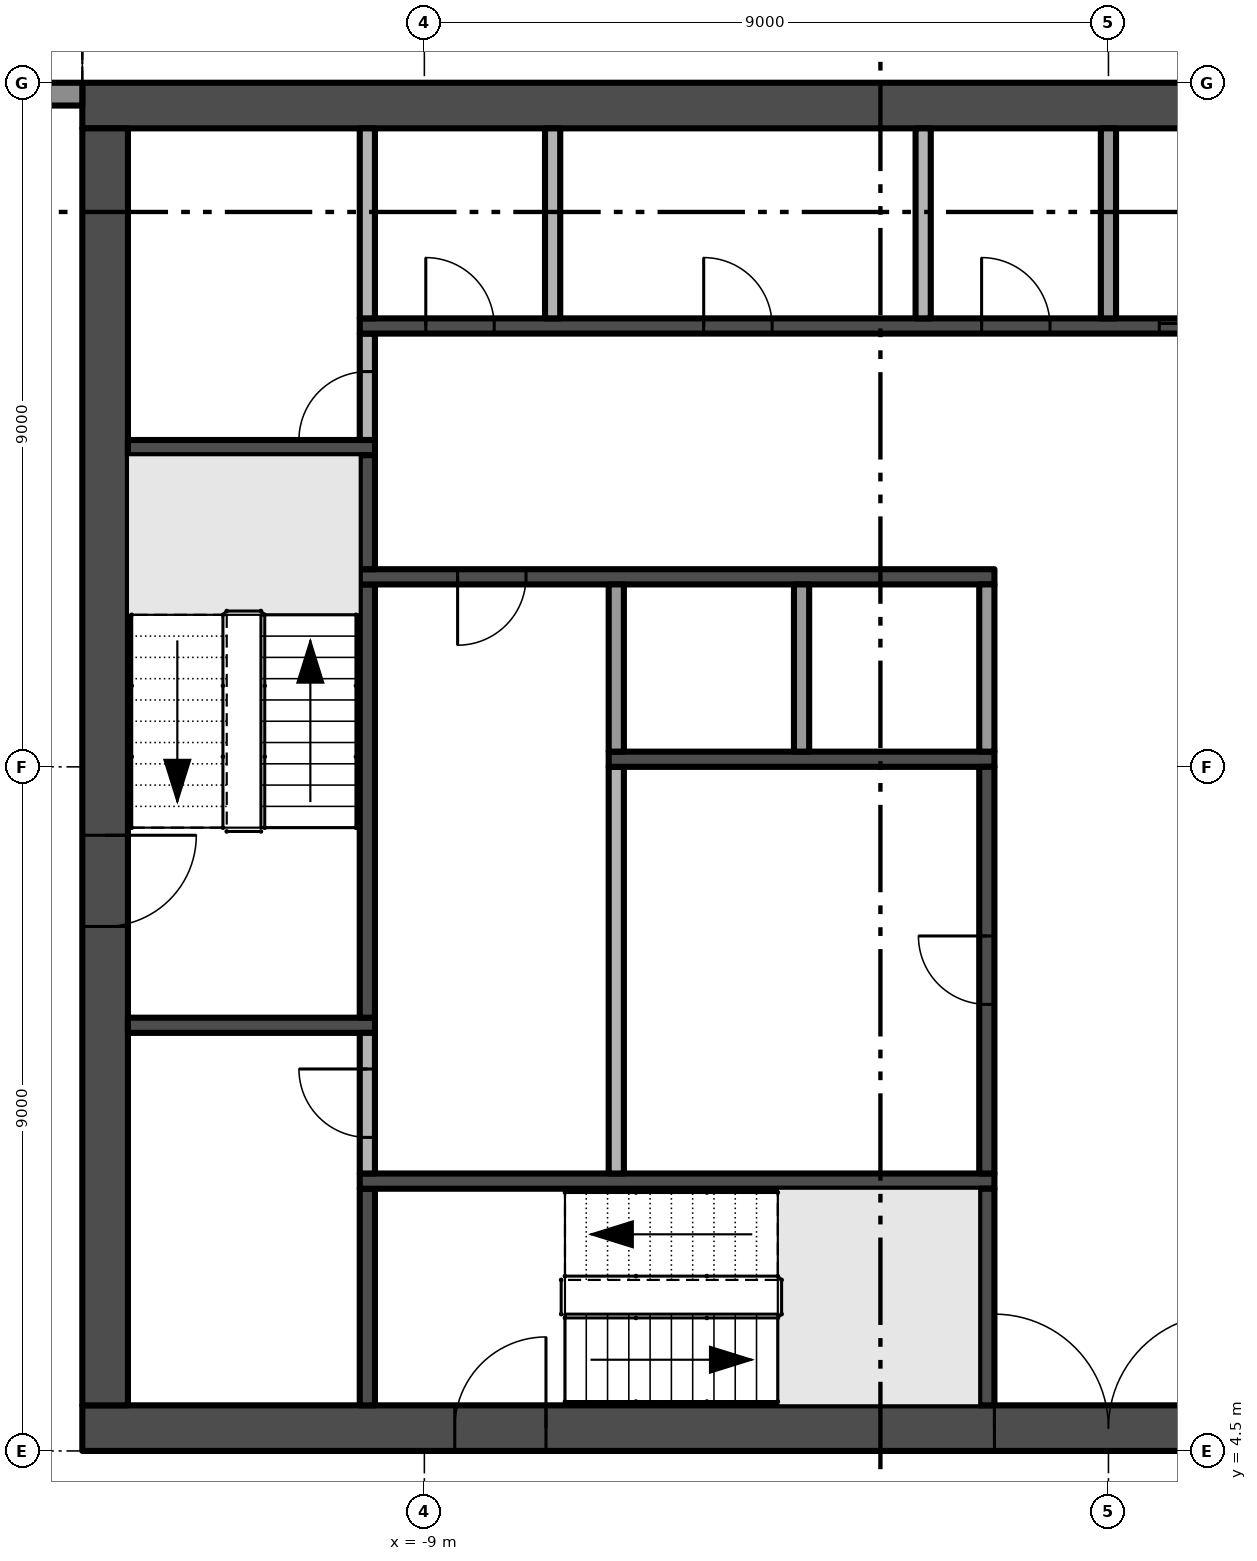
"""IFC4 building model, lengths in metres.
Left out: names, types, materials, properties, quantities, classifications, styles, units other than length and angle.
Written with IfcOpenShell. Run it as: python <this file> out.ifc"""

import sys

from ifc_helpers import new_model, si_unit, direction, frame, frame_2d, origin, place, context, subcontext, project, spatial, polyline, rectangle, outline, extrude, element, fill, save


model = new_model("IFC4")
c1 = context("Model", 3, precision=1e-05, world=origin(), true_north=direction((0.0, 1.0)))
c2 = subcontext(c1, "Body", "Model", "MODEL_VIEW")
j1 = project(units=[si_unit("LENGTHUNIT", "METRE"), si_unit("PLANEANGLEUNIT", "RADIAN")], contexts=[c1])
p1 = place(None, origin())
s1 = spatial("IfcSite", under=j1, at=p1, CompositionType="ELEMENT")
p2 = place(p1, origin())
s2 = spatial("IfcBuilding", under=s1, at=p2, CompositionType="ELEMENT")
p3 = place(p2, frame((0.0, 0.0, 230.0)))
s3 = spatial("IfcBuildingStorey", under=s2, at=p3, CompositionType="ELEMENT", Elevation=230.0)
p4 = place(p3, frame((-13.5, 4.8, -0.3), z_axis=(0.0, 0.0, 1.0), x_axis=(1.0, 0.0, 0.0)))
e1 = element("IfcWall", 1, at=p4, inside=s3, PredefinedType="SHEAR", context=c2, shape_type="SweptSolid", body=[
    extrude(rectangle(XDim=27.0, YDim=0.6, at=frame_2d((13.5, 0.0))), origin(), (0.0, 0.0, 1.0), 3.8),
])
p5 = place(p4, frame((12.0, 0.0, 0.3)))
e2 = element("IfcOpeningElement", 2, at=p5, cuts=e1, PredefinedType="OPENING", context=c2, shape_type="SweptSolid", body=[
    extrude(rectangle(XDim=3.0, YDim=2.4, at=frame_2d((1.5, 1.2))), frame((0.0, 0.31, 0.0), z_axis=(0.0, -1.0, 0.0), x_axis=(1.0, 0.0, 0.0)), (0.0, 0.0, 1.0), 0.62),
])
p6 = place(p4, frame((4.9, 0.0, 0.3)))
e3 = element("IfcOpeningElement", 3, at=p6, cuts=e1, PredefinedType="OPENING", context=c2, shape_type="SweptSolid", body=[
    extrude(rectangle(XDim=1.2, YDim=2.2, at=frame_2d((0.6, 1.1))), frame((0.0, 0.31, 0.0), z_axis=(0.0, -1.0, 0.0), x_axis=(1.0, 0.0, 0.0)), (0.0, 0.0, 1.0), 0.62),
])
p7 = place(p4, frame((20.75, 0.0, 0.3)))
e4 = element("IfcOpeningElement", 4, at=p7, cuts=e1, PredefinedType="OPENING", context=c2, shape_type="SweptSolid", body=[
    extrude(rectangle(XDim=1.5, YDim=2.2, at=frame_2d((0.75, 1.1))), frame((0.0, 0.31, 0.0), z_axis=(0.0, -1.0, 0.0), x_axis=(1.0, 0.0, 0.0)), (0.0, 0.0, 1.0), 0.62),
])
p8 = place(p4, frame((17.4, 0.0, 0.3)))
e5 = element("IfcOpeningElement", 5, at=p8, cuts=e1, PredefinedType="OPENING", context=c2, shape_type="SweptSolid", body=[
    extrude(rectangle(XDim=1.2, YDim=2.2, at=frame_2d((0.6, 1.1))), frame((0.0, 0.31, 0.0), z_axis=(0.0, -1.0, 0.0), x_axis=(1.0, 0.0, 0.0)), (0.0, 0.0, 1.0), 0.62),
])
p9 = place(p3, frame((13.5, 22.2, -0.3), z_axis=(0.0, 0.0, 1.0), x_axis=(-1.0, 0.0, 0.0)))
e6 = element("IfcWall", 6, at=p9, inside=s3, PredefinedType="SHEAR", context=c2, shape_type="SweptSolid", body=[
    extrude(rectangle(XDim=27.0, YDim=0.6, at=frame_2d((13.5, 0.0))), origin(), (0.0, 0.0, 1.0), 3.8),
])
p10 = place(p3, frame((-13.2, 21.9, -0.3), z_axis=(0.0, 0.0, 1.0), x_axis=(0.0, -1.0, 0.0)))
e7 = element("IfcWall", 7, at=p10, inside=s3, PredefinedType="SHEAR", context=c2, shape_type="SweptSolid", body=[
    extrude(rectangle(XDim=16.8, YDim=0.6, at=frame_2d((8.4, 0.0))), origin(), (0.0, 0.0, 1.0), 3.8),
])
p11 = place(p10, frame((9.3, 0.0, 0.3)))
e8 = element("IfcOpeningElement", 8, at=p11, cuts=e7, PredefinedType="OPENING", context=c2, shape_type="SweptSolid", body=[
    extrude(rectangle(XDim=1.2, YDim=2.2, at=frame_2d((0.6, 1.1))), frame((0.0, 0.31, 0.0), z_axis=(0.0, -1.0, 0.0), x_axis=(1.0, 0.0, 0.0)), (0.0, 0.0, 1.0), 0.62),
])
p12 = place(p3, frame((-17.525, 22.35, 0.0), z_axis=(0.0, 0.0, 1.0), x_axis=(1.0, 0.0, 0.0)))
e9 = element("IfcWall", 9, at=p12, inside=s3, PredefinedType="SOLIDWALL", context=c2, shape_type="SweptSolid", body=[
    extrude(rectangle(XDim=4.025, YDim=0.3, at=frame_2d((2.013, 0.0))), origin(), (0.0, 0.0, 1.0), 3.5),
])
p13 = place(p12, frame((0.325, 0.0, 0.45)))
e10 = element("IfcOpeningElement", 10, at=p13, cuts=e9, PredefinedType="OPENING", context=c2, shape_type="SweptSolid", body=[
    extrude(rectangle(XDim=3.075, YDim=2.65, at=frame_2d((1.538, 1.325))), frame((0.0, 0.16, 0.0), z_axis=(0.0, -1.0, 0.0), x_axis=(1.0, 0.0, 0.0)), (0.0, 0.0, 1.0), 0.32),
])
p14 = place(p3, origin())
e11 = element("IfcWall", 11, at=p14, inside=s3, PredefinedType="USERDEFINED", context=c2, shape_type="SweptSolid", body=[
    extrude(outline(polyline([(-13.5, 23.451), (-15.0, 23.115), (-15.375, 23.1), (-16.5, 23.231), (-18.0, 23.755), (-19.5, 24.488), (-21.0, 25.149), (-22.5, 25.485), (-22.555, 25.241), (-21.079, 24.91), (-19.605, 24.261), (-18.096, 23.524), (-16.556, 22.986), (-15.385, 22.849), (-14.967, 22.866), (-13.445, 23.208), (-13.5, 23.451)])), origin(), (0.0, 0.0, 1.0), 0.9),
])
for number, where, z_axis, x_axis in (
    (12, (-12.9, 10.1, 0.0), (0.0, 0.0, 1.0), (1.0, 0.0, 0.0)),
    (13, (-12.9, 17.7, 0.0), (0.0, 0.0, 1.0), (1.0, 0.0, 0.0)),
):
    element("IfcWall", number, at=place(p3, frame(where, z_axis=z_axis, x_axis=x_axis)), inside=s3, PredefinedType="SHEAR", context=c2, shape_type="SweptSolid", body=[
        extrude(rectangle(XDim=3.25, YDim=0.2, at=frame_2d((1.625, 0.0))), origin(), (0.0, 0.0, 1.0), 3.5),
    ])
p15 = place(p3, frame((-9.75, 5.1, 0.0), z_axis=(0.0, 0.0, 1.0), x_axis=(0.0, 1.0, 0.0)))
e14 = element("IfcWall", 14, at=p15, inside=s3, PredefinedType="SHEAR", context=c2, shape_type="SweptSolid", body=[
    extrude(rectangle(XDim=2.85, YDim=0.2, at=frame_2d((1.425, 0.0))), origin(), (0.0, 0.0, 1.0), 3.5),
])
p16 = place(p3, frame((-9.85, 8.05, 0.0), z_axis=(0.0, 0.0, 1.0), x_axis=(1.0, 0.0, 0.0)))
e15 = element("IfcWall", 15, at=p16, inside=s3, PredefinedType="SHEAR", context=c2, shape_type="SweptSolid", body=[
    extrude(rectangle(XDim=8.35, YDim=0.2, at=frame_2d((4.175, 0.0))), origin(), (0.0, 0.0, 1.0), 3.5),
])
p17 = place(p3, frame((-9.75, 8.15, 0.0), z_axis=(0.0, 0.0, 1.0), x_axis=(0.0, 1.0, 0.0)))
e16 = element("IfcWall", 16, at=p17, inside=s3, PredefinedType="PARTITIONING", context=c2, shape_type="SweptSolid", body=[
    extrude(rectangle(XDim=1.85, YDim=0.2, at=frame_2d((0.925, 0.0))), origin(), (0.0, 0.0, 1.0), 3.5),
])
p18 = place(p17, frame((0.475, 0.0, 0.0)))
e17 = element("IfcOpeningElement", 17, at=p18, cuts=e16, PredefinedType="OPENING", context=c2, shape_type="SweptSolid", body=[
    extrude(rectangle(XDim=0.9, YDim=2.1, at=frame_2d((0.45, 1.05))), frame((0.0, 0.11, 0.0), z_axis=(0.0, -1.0, 0.0), x_axis=(1.0, 0.0, 0.0)), (0.0, 0.0, 1.0), 0.22),
])
p19 = place(p3, frame((-9.75, 10.2, 0.0), z_axis=(0.0, 0.0, 1.0), x_axis=(0.0, 1.0, 0.0)))
e18 = element("IfcWall", 18, at=p19, inside=s3, PredefinedType="SHEAR", context=c2, shape_type="SweptSolid", body=[
    extrude(rectangle(XDim=5.7, YDim=0.2, at=frame_2d((2.85, 0.0))), origin(), (0.0, 0.0, 1.0), 3.5),
])
p20 = place(p3, frame((-1.5, 16.0, 0.0), z_axis=(0.0, 0.0, 1.0), x_axis=(-1.0, 0.0, 0.0)))
e19 = element("IfcWall", 19, at=p20, inside=s3, PredefinedType="SHEAR", context=c2, shape_type="SweptSolid", body=[
    extrude(rectangle(XDim=8.35, YDim=0.2, at=frame_2d((4.175, 0.0))), origin(), (0.0, 0.0, 1.0), 3.5),
])
p21 = place(p20, frame((6.162, 0.0, 0.0)))
e20 = element("IfcOpeningElement", 20, at=p21, cuts=e19, PredefinedType="OPENING", context=c2, shape_type="SweptSolid", body=[
    extrude(rectangle(XDim=0.9, YDim=2.1, at=frame_2d((0.45, 1.05))), frame((0.0, 0.11, 0.0), z_axis=(0.0, -1.0, 0.0), x_axis=(1.0, 0.0, 0.0)), (0.0, 0.0, 1.0), 0.22),
])
p22 = place(p3, frame((-9.75, 16.1, 0.0), z_axis=(0.0, 0.0, 1.0), x_axis=(0.0, 1.0, 0.0)))
e21 = element("IfcWall", 21, at=p22, inside=s3, PredefinedType="SHEAR", context=c2, shape_type="SweptSolid", body=[
    extrude(rectangle(XDim=1.5, YDim=0.2, at=frame_2d((0.75, 0.0))), origin(), (0.0, 0.0, 1.0), 3.5),
])
p23 = place(p3, frame((-9.75, 17.8, 0.0), z_axis=(0.0, 0.0, 1.0), x_axis=(0.0, 1.0, 0.0)))
e22 = element("IfcWall", 22, at=p23, inside=s3, PredefinedType="PARTITIONING", context=c2, shape_type="SweptSolid", body=[
    extrude(rectangle(XDim=1.4, YDim=0.2, at=frame_2d((0.7, 0.0))), origin(), (0.0, 0.0, 1.0), 3.5),
])
p24 = place(p23, origin())
e23 = element("IfcOpeningElement", 23, at=p24, cuts=e22, PredefinedType="OPENING", context=c2, shape_type="SweptSolid", body=[
    extrude(rectangle(XDim=0.9, YDim=2.1, at=frame_2d((0.45, 1.05))), frame((0.0, 0.11, 0.0), z_axis=(0.0, -1.0, 0.0), x_axis=(1.0, 0.0, 0.0)), (0.0, 0.0, 1.0), 0.22),
])
p25 = place(p3, frame((-9.85, 19.3, 0.0), z_axis=(0.0, 0.0, 1.0), x_axis=(1.0, 0.0, 0.0)))
e24 = element("IfcWall", 24, at=p25, inside=s3, PredefinedType="SHEAR", context=c2, shape_type="SweptSolid", body=[
    extrude(rectangle(XDim=19.7, YDim=0.2, at=frame_2d((9.85, 0.0))), origin(), (0.0, 0.0, 1.0), 3.5),
])
p26 = place(p25, frame((10.519, 0.0, 0.0)))
e25 = element("IfcOpeningElement", 25, at=p26, cuts=e24, PredefinedType="OPENING", context=c2, shape_type="SweptSolid", body=[
    extrude(rectangle(XDim=1.1, YDim=2.1, at=frame_2d((0.55, 1.05))), frame((0.0, 0.11, 0.0), z_axis=(0.0, -1.0, 0.0), x_axis=(1.0, 0.0, 0.0)), (0.0, 0.0, 1.0), 0.22),
])
p27 = place(p25, frame((12.956, 0.0, 0.0)))
e26 = element("IfcOpeningElement", 26, at=p27, cuts=e24, PredefinedType="OPENING", context=c2, shape_type="SweptSolid", body=[
    extrude(rectangle(XDim=1.1, YDim=2.1, at=frame_2d((0.55, 1.05))), frame((0.0, 0.11, 0.0), z_axis=(0.0, -1.0, 0.0), x_axis=(1.0, 0.0, 0.0)), (0.0, 0.0, 1.0), 0.22),
])
p28 = place(p25, frame((15.394, 0.0, 0.0)))
e27 = element("IfcOpeningElement", 27, at=p28, cuts=e24, PredefinedType="OPENING", context=c2, shape_type="SweptSolid", body=[
    extrude(rectangle(XDim=1.1, YDim=2.1, at=frame_2d((0.55, 1.05))), frame((0.0, 0.11, 0.0), z_axis=(0.0, -1.0, 0.0), x_axis=(1.0, 0.0, 0.0)), (0.0, 0.0, 1.0), 0.22),
])
p29 = place(p25, frame((17.831, 0.0, 0.0)))
e28 = element("IfcOpeningElement", 28, at=p29, cuts=e24, PredefinedType="OPENING", context=c2, shape_type="SweptSolid", body=[
    extrude(rectangle(XDim=1.1, YDim=2.1, at=frame_2d((0.55, 1.05))), frame((0.0, 0.11, 0.0), z_axis=(0.0, -1.0, 0.0), x_axis=(1.0, 0.0, 0.0)), (0.0, 0.0, 1.0), 0.22),
])
p30 = place(p25, frame((0.869, 0.0, 0.0)))
e29 = element("IfcOpeningElement", 29, at=p30, cuts=e24, PredefinedType="OPENING", context=c2, shape_type="SweptSolid", body=[
    extrude(rectangle(XDim=0.9, YDim=2.1, at=frame_2d((0.45, 1.05))), frame((0.0, 0.11, 0.0), z_axis=(0.0, -1.0, 0.0), x_axis=(1.0, 0.0, 0.0)), (0.0, 0.0, 1.0), 0.22),
])
p31 = place(p25, frame((4.525, 0.0, 0.0)))
e30 = element("IfcOpeningElement", 30, at=p31, cuts=e24, PredefinedType="OPENING", context=c2, shape_type="SweptSolid", body=[
    extrude(rectangle(XDim=0.9, YDim=2.1, at=frame_2d((0.45, 1.05))), frame((0.0, 0.11, 0.0), z_axis=(0.0, -1.0, 0.0), x_axis=(1.0, 0.0, 0.0)), (0.0, 0.0, 1.0), 0.22),
])
p32 = place(p25, frame((8.181, 0.0, 0.0)))
e31 = element("IfcOpeningElement", 31, at=p32, cuts=e24, PredefinedType="OPENING", context=c2, shape_type="SweptSolid", body=[
    extrude(rectangle(XDim=0.9, YDim=2.1, at=frame_2d((0.45, 1.05))), frame((0.0, 0.11, 0.0), z_axis=(0.0, -1.0, 0.0), x_axis=(1.0, 0.0, 0.0)), (0.0, 0.0, 1.0), 0.22),
])
for number, where, z_axis, x_axis in (
    (32, (-9.75, 19.4, 0.0), (0.0, 0.0, 1.0), (0.0, 1.0, 0.0)),
    (33, (-7.312, 19.4, 0.0), (0.0, 0.0, 1.0), (0.0, 1.0, 0.0)),
):
    element("IfcWall", number, at=place(p3, frame(where, z_axis=z_axis, x_axis=x_axis)), inside=s3, PredefinedType="PARTITIONING", context=c2, shape_type="SweptSolid", body=[
        extrude(rectangle(XDim=2.5, YDim=0.2, at=frame_2d((1.25, 0.0))), origin(), (0.0, 0.0, 1.0), 3.5),
    ])
p33 = place(p3, frame((-6.475, 8.15, 0.0), z_axis=(0.0, 0.0, 1.0), x_axis=(0.0, 1.0, 0.0)))
e34 = element("IfcWall", 34, at=p33, inside=s3, PredefinedType="PARTITIONING", context=c2, shape_type="SweptSolid", body=[
    extrude(rectangle(XDim=5.35, YDim=0.2, at=frame_2d((2.675, 0.0))), origin(), (0.0, 0.0, 1.0), 3.5),
])
p34 = place(p3, frame((-6.575, 13.6, 0.0), z_axis=(0.0, 0.0, 1.0), x_axis=(1.0, 0.0, 0.0)))
e35 = element("IfcWall", 35, at=p34, inside=s3, PredefinedType="SHEAR", context=c2, shape_type="SweptSolid", body=[
    extrude(rectangle(XDim=5.075, YDim=0.2, at=frame_2d((2.538, 0.0))), origin(), (0.0, 0.0, 1.0), 3.5),
])
for number, where, z_axis, x_axis in (
    (36, (-6.475, 13.7, 0.0), (0.0, 0.0, 1.0), (0.0, 1.0, 0.0)),
    (37, (-4.037, 13.7, 0.0), (0.0, 0.0, 1.0), (0.0, 1.0, 0.0)),
):
    element("IfcWall", number, at=place(p3, frame(where, z_axis=z_axis, x_axis=x_axis)), inside=s3, PredefinedType="PARTITIONING", context=c2, shape_type="SweptSolid", body=[
        extrude(rectangle(XDim=2.2, YDim=0.2, at=frame_2d((1.1, 0.0))), origin(), (0.0, 0.0, 1.0), 3.5),
    ])
p35 = place(p3, frame((-2.438, 19.4, 0.0), z_axis=(0.0, 0.0, 1.0), x_axis=(0.0, 1.0, 0.0)))
e38 = element("IfcWall", 38, at=p35, inside=s3, PredefinedType="PARTITIONING", context=c2, shape_type="SweptSolid", body=[
    extrude(rectangle(XDim=2.5, YDim=0.2, at=frame_2d((1.25, 0.0))), origin(), (0.0, 0.0, 1.0), 3.5),
])
p36 = place(p3, frame((-1.6, 5.1, 0.0), z_axis=(0.0, 0.0, 1.0), x_axis=(0.0, 1.0, 0.0)))
e39 = element("IfcWall", 39, at=p36, inside=s3, PredefinedType="SHEAR", context=c2, shape_type="SweptSolid", body=[
    extrude(rectangle(XDim=2.85, YDim=0.2, at=frame_2d((1.425, 0.0))), origin(), (0.0, 0.0, 1.0), 3.5),
])
p37 = place(p3, frame((-1.6, 8.15, 0.0), z_axis=(0.0, 0.0, 1.0), x_axis=(0.0, 1.0, 0.0)))
e40 = element("IfcWall", 40, at=p37, inside=s3, PredefinedType="SHEAR", context=c2, shape_type="SweptSolid", body=[
    extrude(rectangle(XDim=5.35, YDim=0.2, at=frame_2d((2.675, 0.0))), origin(), (0.0, 0.0, 1.0), 3.5),
])
p38 = place(p37, frame((2.225, 0.0, 0.0)))
e41 = element("IfcOpeningElement", 41, at=p38, cuts=e40, PredefinedType="OPENING", context=c2, shape_type="SweptSolid", body=[
    extrude(rectangle(XDim=0.9, YDim=2.1, at=frame_2d((0.45, 1.05))), frame((0.0, 0.11, 0.0), z_axis=(0.0, -1.0, 0.0), x_axis=(1.0, 0.0, 0.0)), (0.0, 0.0, 1.0), 0.22),
])
p39 = place(p3, frame((-1.6, 13.7, 0.0), z_axis=(0.0, 0.0, 1.0), x_axis=(0.0, 1.0, 0.0)))
e42 = element("IfcWall", 42, at=p39, inside=s3, PredefinedType="PARTITIONING", context=c2, shape_type="SweptSolid", body=[
    extrude(rectangle(XDim=2.2, YDim=0.2, at=frame_2d((1.1, 0.0))), origin(), (0.0, 0.0, 1.0), 3.5),
])
p40 = place(p3, frame((0.0, 19.4, 0.0), z_axis=(0.0, 0.0, 1.0), x_axis=(0.0, 1.0, 0.0)))
e43 = element("IfcWall", 43, at=p40, inside=s3, PredefinedType="PARTITIONING", context=c2, shape_type="SweptSolid", body=[
    extrude(rectangle(XDim=2.5, YDim=0.2, at=frame_2d((1.25, 0.0))), origin(), (0.0, 0.0, 1.0), 3.5),
])
p41 = place(p5, frame((3.0, 0.0, 0.0), z_axis=(0.0, 0.0, 1.0), x_axis=(-1.0, 0.0, 0.0)))
e44 = element("IfcDoor", 44, at=p41, inside=s3, OperationType="DOUBLE_DOOR_SINGLE_SWING", PredefinedType="DOOR", context=c2, shape_type="SweptSolid", body=[
    extrude(rectangle(XDim=3.0, YDim=2.4, at=frame_2d((1.5, 1.2))), frame((0.0, 0.025, 0.0), z_axis=(0.0, -1.0, 0.0), x_axis=(1.0, 0.0, 0.0)), (0.0, 0.0, 1.0), 0.05),
])
fill(e2, e44)
p42 = place(p11, frame((1.2, 0.0, 0.0), z_axis=(0.0, 0.0, 1.0), x_axis=(-1.0, 0.0, 0.0)))
e45 = element("IfcDoor", 45, at=p42, inside=s3, OperationType="SINGLE_SWING_RIGHT", PredefinedType="DOOR", context=c2, shape_type="SweptSolid", body=[
    extrude(rectangle(XDim=1.2, YDim=2.2, at=frame_2d((0.6, 1.1))), frame((0.0, 0.025, 0.0), z_axis=(0.0, -1.0, 0.0), x_axis=(1.0, 0.0, 0.0)), (0.0, 0.0, 1.0), 0.05),
])
fill(e8, e45)
p43 = place(p6, frame((1.2, 0.0, 0.0), z_axis=(0.0, 0.0, 1.0), x_axis=(-1.0, 0.0, 0.0)))
e46 = element("IfcDoor", 46, at=p43, inside=s3, OperationType="SINGLE_SWING_LEFT", PredefinedType="DOOR", context=c2, shape_type="SweptSolid", body=[
    extrude(rectangle(XDim=1.2, YDim=2.2, at=frame_2d((0.6, 1.1))), frame((0.0, 0.025, 0.0), z_axis=(0.0, -1.0, 0.0), x_axis=(1.0, 0.0, 0.0)), (0.0, 0.0, 1.0), 0.05),
])
fill(e3, e46)
p44 = place(p26, origin())
e47 = element("IfcDoor", 47, at=p44, inside=s3, OperationType="SLIDING_TO_RIGHT", PredefinedType="DOOR", context=c2, shape_type="SweptSolid", body=[
    extrude(rectangle(XDim=1.1, YDim=2.1, at=frame_2d((0.55, 1.05))), frame((0.0, 0.025, 0.0), z_axis=(0.0, -1.0, 0.0), x_axis=(1.0, 0.0, 0.0)), (0.0, 0.0, 1.0), 0.05),
])
fill(e25, e47)
p45 = place(p21, origin())
e48 = element("IfcDoor", 48, at=p45, inside=s3, OperationType="SINGLE_SWING_RIGHT", PredefinedType="DOOR", context=c2, shape_type="SweptSolid", body=[
    extrude(rectangle(XDim=0.9, YDim=2.1, at=frame_2d((0.45, 1.05))), frame((0.0, 0.025, 0.0), z_axis=(0.0, -1.0, 0.0), x_axis=(1.0, 0.0, 0.0)), (0.0, 0.0, 1.0), 0.05),
])
fill(e20, e48)
p46 = place(p38, origin())
e49 = element("IfcDoor", 49, at=p46, inside=s3, OperationType="SINGLE_SWING_RIGHT", PredefinedType="DOOR", context=c2, shape_type="SweptSolid", body=[
    extrude(rectangle(XDim=0.9, YDim=2.1, at=frame_2d((0.45, 1.05))), frame((0.0, 0.025, 0.0), z_axis=(0.0, -1.0, 0.0), x_axis=(1.0, 0.0, 0.0)), (0.0, 0.0, 1.0), 0.05),
])
fill(e41, e49)
p47 = place(p24, origin())
e50 = element("IfcDoor", 50, at=p47, inside=s3, OperationType="SINGLE_SWING_LEFT", PredefinedType="DOOR", context=c2, shape_type="SweptSolid", body=[
    extrude(rectangle(XDim=0.9, YDim=2.1, at=frame_2d((0.45, 1.05))), frame((0.0, 0.025, 0.0), z_axis=(0.0, -1.0, 0.0), x_axis=(1.0, 0.0, 0.0)), (0.0, 0.0, 1.0), 0.05),
])
fill(e23, e50)
p48 = place(p30, origin())
e51 = element("IfcDoor", 51, at=p48, inside=s3, OperationType="SINGLE_SWING_LEFT", PredefinedType="DOOR", context=c2, shape_type="SweptSolid", body=[
    extrude(rectangle(XDim=0.9, YDim=2.1, at=frame_2d((0.45, 1.05))), frame((0.0, 0.025, 0.0), z_axis=(0.0, -1.0, 0.0), x_axis=(1.0, 0.0, 0.0)), (0.0, 0.0, 1.0), 0.05),
])
fill(e29, e51)
p49 = place(p31, origin())
e52 = element("IfcDoor", 52, at=p49, inside=s3, OperationType="SINGLE_SWING_LEFT", PredefinedType="DOOR", context=c2, shape_type="SweptSolid", body=[
    extrude(rectangle(XDim=0.9, YDim=2.1, at=frame_2d((0.45, 1.05))), frame((0.0, 0.025, 0.0), z_axis=(0.0, -1.0, 0.0), x_axis=(1.0, 0.0, 0.0)), (0.0, 0.0, 1.0), 0.05),
])
fill(e30, e52)
p50 = place(p32, origin())
e53 = element("IfcDoor", 53, at=p50, inside=s3, OperationType="SINGLE_SWING_LEFT", PredefinedType="DOOR", context=c2, shape_type="SweptSolid", body=[
    extrude(rectangle(XDim=0.9, YDim=2.1, at=frame_2d((0.45, 1.05))), frame((0.0, 0.025, 0.0), z_axis=(0.0, -1.0, 0.0), x_axis=(1.0, 0.0, 0.0)), (0.0, 0.0, 1.0), 0.05),
])
fill(e31, e53)
p51 = place(p18, origin())
e54 = element("IfcDoor", 54, at=p51, inside=s3, OperationType="SINGLE_SWING_RIGHT", PredefinedType="DOOR", context=c2, shape_type="SweptSolid", body=[
    extrude(rectangle(XDim=0.9, YDim=2.1, at=frame_2d((0.45, 1.05))), frame((0.0, 0.025, 0.0), z_axis=(0.0, -1.0, 0.0), x_axis=(1.0, 0.0, 0.0)), (0.0, 0.0, 1.0), 0.05),
])
fill(e17, e54)
save(model, sys.argv[1])
